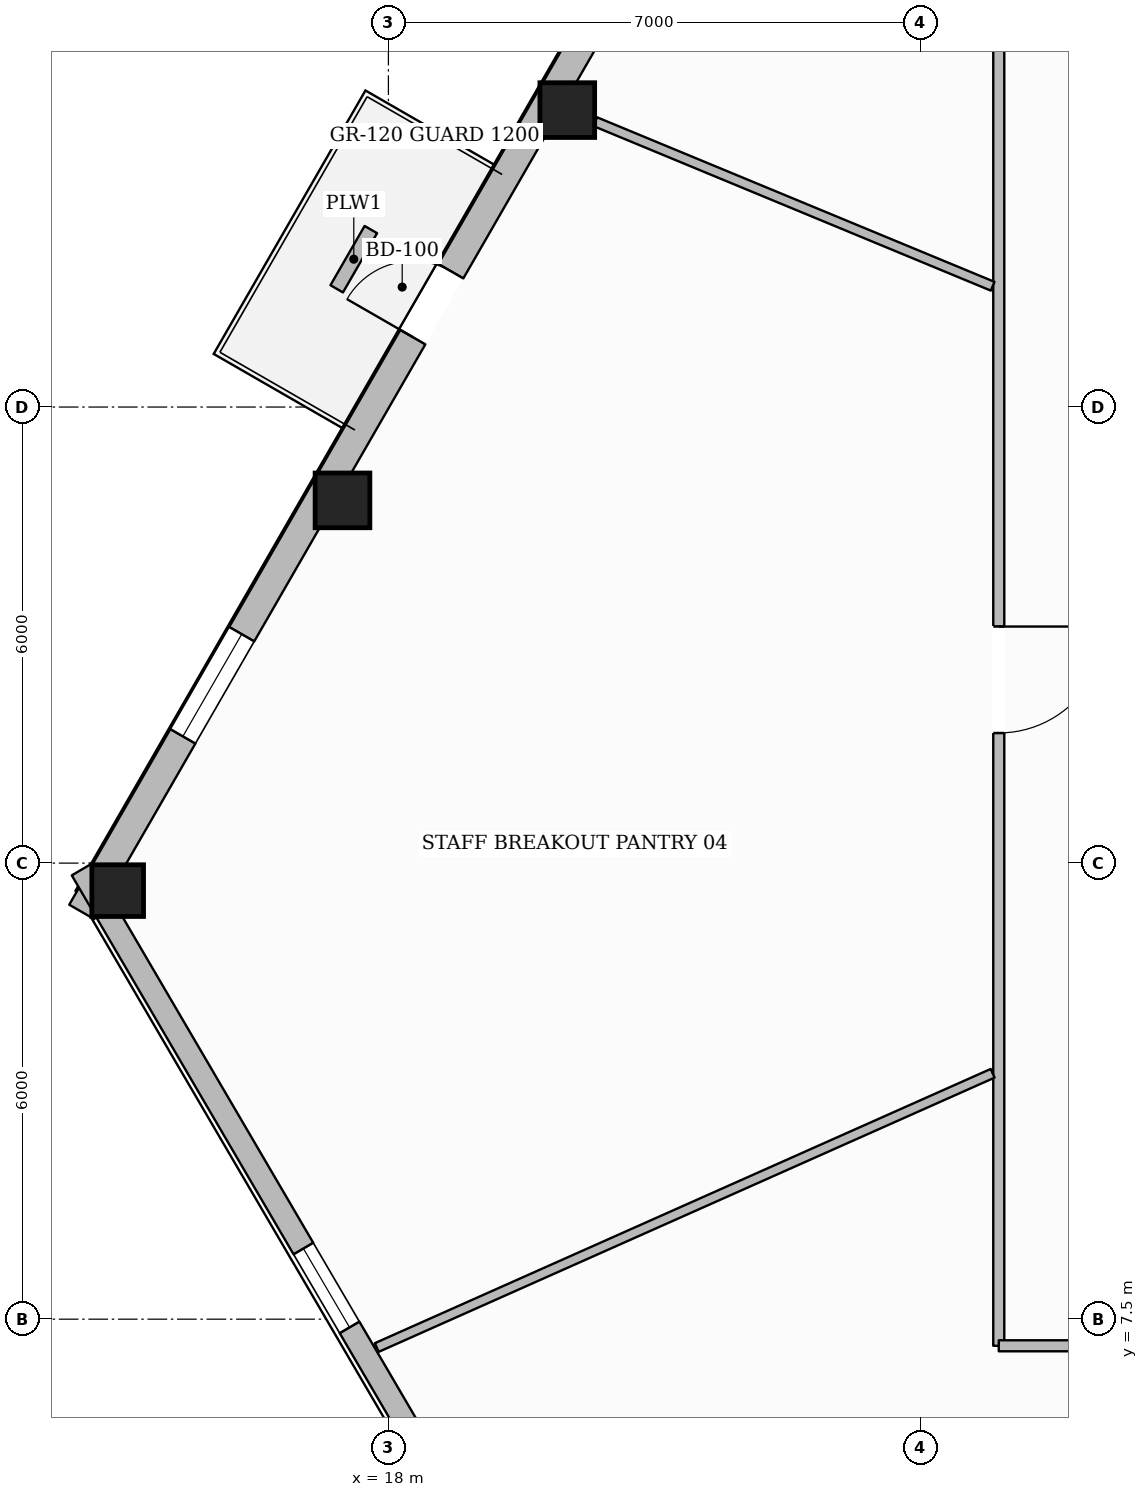
"""IFC4 building model, lengths in metres.
Left out: names, types, materials, properties, quantities, classifications, styles, units other than length and angle.
Written with IfcOpenShell. Run it as: python <this file> out.ifc"""

import sys

from ifc_helpers import new_model, si_unit, direction, frame, frame_2d, origin, origin_2d, place, context, subcontext, project, spatial, rectangle, hollow_rectangle, extrude, element, fill, save


model = new_model("IFC4")
c1 = context("Model", 3, precision=1e-05, world=origin(), true_north=direction((0.0, 1.0)))
c2 = subcontext(c1, "Body", "Model", "MODEL_VIEW")
j1 = project(units=[si_unit("LENGTHUNIT", "METRE"), si_unit("PLANEANGLEUNIT", "RADIAN")], contexts=[c1])
p1 = place(None, origin())
s1 = spatial("IfcSite", under=j1, at=p1, CompositionType="ELEMENT")
p2 = place(p1, origin())
s2 = spatial("IfcBuilding", under=s1, at=p2, CompositionType="ELEMENT")
p3 = place(p2, frame((0.0, 0.0, 120.15)))
s3 = spatial("IfcBuildingStorey", under=s2, at=p3, CompositionType="ELEMENT", Elevation=120.15)
for number, where, z_axis, x_axis in (
    (1, (20.354, 23.406, 0.0), (0.0, 0.0, 1.0), (1.0, 0.0, 0.0)),
    (2, (17.396, 18.272, 0.0), (0.0, 0.0, 1.0), (1.0, 0.0, 0.0)),
):
    element("IfcColumn", number, at=place(p3, frame(where, z_axis=z_axis, x_axis=x_axis)), inside=s3, PredefinedType="COLUMN", context=c2, shape_type="SweptSolid", body=[
        extrude(hollow_rectangle(XDim=0.72, YDim=0.72, WallThickness=0.032, at=origin_2d()), origin(), (0.0, 0.0, 1.0), 3.6),
    ])
p4 = place(p3, frame((14.438, 13.138, 0.0), z_axis=(0.0, 0.0, 1.0), x_axis=(1.0, 0.0, 0.0)))
e3 = element("IfcColumn", 3, at=p4, inside=s3, PredefinedType="COLUMN", context=c2, shape_type="SweptSolid", body=[
    extrude(hollow_rectangle(XDim=0.68, YDim=0.68, WallThickness=0.03, at=origin_2d()), origin(), (0.0, 0.0, 1.0), 3.6),
])
p5 = place(p3, frame((13.966, 12.858, 0.0), z_axis=(0.0, 0.0, 1.0), x_axis=(0.499138995893, 0.86652193439, 0.0)))
e4 = element("IfcWall", 4, at=p5, inside=s3, PredefinedType="STANDARD", context=c2, shape_type="SweptSolid", body=[
    extrude(rectangle(XDim=36.509, YDim=0.38, at=frame_2d((18.255, 0.0))), origin(), (0.0, 0.0, 1.0), 3.059),
])
p6 = place(p5, frame((8.727, 0.0, 0.0)))
e5 = element("IfcOpeningElement", 5, at=p6, cuts=e4, PredefinedType="OPENING", context=c2, shape_type="SweptSolid", body=[
    extrude(rectangle(XDim=1.0, YDim=2.2, at=frame_2d((0.5, 1.1))), frame((0.0, 0.2, 0.0), z_axis=(0.0, -1.0, 0.0), x_axis=(1.0, 0.0, 0.0)), (0.0, 0.0, 1.0), 0.4),
])
p7 = place(p5, frame((32.292, 0.0, 0.65)))
e6 = element("IfcOpeningElement", 6, at=p7, cuts=e4, PredefinedType="OPENING", context=c2, shape_type="SweptSolid", body=[
    extrude(rectangle(XDim=1.55, YDim=1.75, at=frame_2d((0.775, 0.875))), frame((0.0, 0.2, 0.0), z_axis=(0.0, -1.0, 0.0), x_axis=(1.0, 0.0, 0.0)), (0.0, 0.0, 1.0), 0.4),
])
p8 = place(p5, frame((26.367, 0.0, 0.65)))
e7 = element("IfcOpeningElement", 7, at=p8, cuts=e4, PredefinedType="OPENING", context=c2, shape_type="SweptSolid", body=[
    extrude(rectangle(XDim=1.55, YDim=1.75, at=frame_2d((0.775, 0.875))), frame((0.0, 0.2, 0.0), z_axis=(0.0, -1.0, 0.0), x_axis=(1.0, 0.0, 0.0)), (0.0, 0.0, 1.0), 0.4),
])
p9 = place(p5, frame((20.442, 0.0, 0.65)))
e8 = element("IfcOpeningElement", 8, at=p9, cuts=e4, PredefinedType="OPENING", context=c2, shape_type="SweptSolid", body=[
    extrude(rectangle(XDim=1.55, YDim=1.75, at=frame_2d((0.775, 0.875))), frame((0.0, 0.2, 0.0), z_axis=(0.0, -1.0, 0.0), x_axis=(1.0, 0.0, 0.0)), (0.0, 0.0, 1.0), 0.4),
])
p10 = place(p5, frame((2.666, 0.0, 0.65)))
e9 = element("IfcOpeningElement", 9, at=p10, cuts=e4, PredefinedType="OPENING", context=c2, shape_type="SweptSolid", body=[
    extrude(rectangle(XDim=1.55, YDim=1.75, at=frame_2d((0.775, 0.875))), frame((0.0, 0.2, 0.0), z_axis=(0.0, -1.0, 0.0), x_axis=(1.0, 0.0, 0.0)), (0.0, 0.0, 1.0), 0.4),
])
p11 = place(p3, frame((20.407, 2.406, 0.0), z_axis=(0.0, 0.0, 1.0), x_axis=(-0.505148604042, 0.863032379366, 0.0)))
e10 = element("IfcWall", 10, at=p11, inside=s3, PredefinedType="STANDARD", context=c2, shape_type="SweptSolid", body=[
    extrude(rectangle(XDim=12.755, YDim=0.3, at=frame_2d((6.378, 0.0))), origin(), (0.0, 0.0, 1.0), 3.059),
])
p12 = place(p11, frame((5.778, 0.0, 0.65)))
e11 = element("IfcOpeningElement", 11, at=p12, cuts=e10, PredefinedType="OPENING", context=c2, shape_type="SweptSolid", body=[
    extrude(rectangle(XDim=1.2, YDim=1.7, at=frame_2d((0.6, 0.85))), frame((0.0, 0.16, 0.0), z_axis=(0.0, -1.0, 0.0), x_axis=(1.0, 0.0, 0.0)), (0.0, 0.0, 1.0), 0.32),
])
p13 = place(p3, frame((17.769, 21.835, 0.0), z_axis=(0.0, 0.0, 1.0), x_axis=(-0.499174352876, -0.866501566895, 0.0)))
e12 = element("IfcWall", 12, at=p13, inside=s3, PredefinedType="USERDEFINED", context=c2, shape_type="SweptSolid", body=[
    extrude(rectangle(XDim=0.9, YDim=0.19, at=frame_2d((0.45, 0.0))), origin(), (0.0, 0.0, 1.0), 0.5),
])
p14 = place(p3, frame((26.03, 25.05, 0.0), z_axis=(0.0, 0.0, 1.0), x_axis=(0.0, -1.0, 0.0)))
e13 = element("IfcWall", 13, at=p14, inside=s3, PredefinedType="PARTITIONING", context=c2, shape_type="SweptSolid", body=[
    extrude(rectangle(XDim=17.9, YDim=0.145, at=frame_2d((8.95, 0.0))), origin(), (0.0, 0.0, 1.0), 3.288),
])
p15 = place(p14, frame((8.438, 0.0, 0.0)))
e14 = element("IfcOpeningElement", 14, at=p15, cuts=e13, PredefinedType="OPENING", context=c2, shape_type="SweptSolid", body=[
    extrude(rectangle(XDim=1.4, YDim=2.2, at=frame_2d((0.7, 1.1))), frame((0.0, 0.083, 0.0), z_axis=(0.0, -1.0, 0.0), x_axis=(1.0, 0.0, 0.0)), (0.0, 0.0, 1.0), 0.165),
])
p16 = place(p3, frame((26.03, 7.15, 0.0), z_axis=(0.0, 0.0, 1.0), x_axis=(1.0, 0.0, 0.0)))
e15 = element("IfcWall", 15, at=p16, inside=s3, PredefinedType="PARTITIONING", context=c2, shape_type="SweptSolid", body=[
    extrude(rectangle(XDim=23.94, YDim=0.145, at=frame_2d((11.97, 0.0))), origin(), (0.0, 0.0, 1.0), 3.6),
])
p17 = place(p16, frame((4.53, 0.0, 0.0)))
e16 = element("IfcOpeningElement", 16, at=p17, cuts=e15, PredefinedType="OPENING", context=c2, shape_type="SweptSolid", body=[
    extrude(rectangle(XDim=0.88, YDim=2.1, at=frame_2d((0.44, 1.05))), frame((0.0, 0.083, 0.0), z_axis=(0.0, -1.0, 0.0), x_axis=(1.0, 0.0, 0.0)), (0.0, 0.0, 1.0), 0.165),
])
p18 = place(p16, frame((7.05, 0.0, 0.0)))
e17 = element("IfcOpeningElement", 17, at=p18, cuts=e15, PredefinedType="OPENING", context=c2, shape_type="SweptSolid", body=[
    extrude(rectangle(XDim=0.88, YDim=2.1, at=frame_2d((0.44, 1.05))), frame((0.0, 0.083, 0.0), z_axis=(0.0, -1.0, 0.0), x_axis=(1.0, 0.0, 0.0)), (0.0, 0.0, 1.0), 0.165),
])
p19 = place(p16, frame((9.43, 0.0, 0.0)))
e18 = element("IfcOpeningElement", 18, at=p19, cuts=e15, PredefinedType="OPENING", context=c2, shape_type="SweptSolid", body=[
    extrude(rectangle(XDim=0.96, YDim=2.1, at=frame_2d((0.48, 1.05))), frame((0.0, 0.083, 0.0), z_axis=(0.0, -1.0, 0.0), x_axis=(1.0, 0.0, 0.0)), (0.0, 0.0, 1.0), 0.165),
])
p20 = place(p16, frame((14.946, 0.0, 0.0)))
e19 = element("IfcOpeningElement", 19, at=p20, cuts=e15, PredefinedType="OPENING", context=c2, shape_type="SweptSolid", body=[
    extrude(rectangle(XDim=1.4, YDim=2.2, at=frame_2d((0.7, 1.1))), frame((0.0, 0.083, 0.0), z_axis=(0.0, -1.0, 0.0), x_axis=(1.0, 0.0, 0.0)), (0.0, 0.0, 1.0), 0.165),
])
p21 = place(p3, frame((25.949, 21.089, 0.0), z_axis=(0.0, 0.0, 1.0), x_axis=(-0.923924819646, 0.382574081246, 0.0)))
e20 = element("IfcWall", 20, at=p21, inside=s3, PredefinedType="PARTITIONING", context=c2, shape_type="SweptSolid", body=[
    extrude(rectangle(XDim=5.658, YDim=0.125, at=frame_2d((2.829, 0.0))), origin(), (0.0, 0.0, 1.0), 3.141),
])
p22 = place(p3, frame((25.949, 10.735, 0.0), z_axis=(0.0, 0.0, 1.0), x_axis=(-0.913542336497, -0.406743653211, 0.0)))
e21 = element("IfcWall", 21, at=p22, inside=s3, PredefinedType="PARTITIONING", context=c2, shape_type="SweptSolid", body=[
    extrude(rectangle(XDim=8.87, YDim=0.125, at=frame_2d((4.435, 0.0))), origin(), (0.0, 0.0, 1.0), 3.6),
])
p23 = place(p6, origin())
e22 = element("IfcDoor", 22, at=p23, inside=s3, OperationType="SINGLE_SWING_LEFT", PredefinedType="DOOR", context=c2, shape_type="SweptSolid", body=[
    extrude(rectangle(XDim=1.0, YDim=2.2, at=frame_2d((0.5, 1.1))), frame((0.0, 0.025, 0.0), z_axis=(0.0, -1.0, 0.0), x_axis=(1.0, 0.0, 0.0)), (0.0, 0.0, 1.0), 0.05),
])
fill(e5, e22)
p24 = place(p10, origin())
e23 = element("IfcWindow", 23, at=p24, inside=s3, PartitioningType="SINGLE_PANEL", PredefinedType="WINDOW", context=c2, shape_type="SweptSolid", body=[
    extrude(rectangle(XDim=1.55, YDim=1.75, at=frame_2d((0.775, 0.875))), frame((0.0, 0.03, 0.0), z_axis=(0.0, -1.0, 0.0), x_axis=(1.0, 0.0, 0.0)), (0.0, 0.0, 1.0), 0.06),
])
fill(e9, e23)
p25 = place(p12, origin())
e24 = element("IfcWindow", 24, at=p25, inside=s3, PartitioningType="SINGLE_PANEL", PredefinedType="WINDOW", context=c2, shape_type="SweptSolid", body=[
    extrude(rectangle(XDim=1.2, YDim=1.7, at=frame_2d((0.6, 0.85))), frame((0.0, 0.03, 0.0), z_axis=(0.0, -1.0, 0.0), x_axis=(1.0, 0.0, 0.0)), (0.0, 0.0, 1.0), 0.06),
])
fill(e11, e24)
p26 = place(p15, origin())
e25 = element("IfcDoor", 25, at=p26, inside=s3, OperationType="SINGLE_SWING_LEFT", PredefinedType="DOOR", context=c2, shape_type="SweptSolid", body=[
    extrude(rectangle(XDim=1.4, YDim=2.2, at=frame_2d((0.7, 1.1))), frame((0.0, 0.025, 0.0), z_axis=(0.0, -1.0, 0.0), x_axis=(1.0, 0.0, 0.0)), (0.0, 0.0, 1.0), 0.05),
])
fill(e14, e25)
save(model, sys.argv[1])
